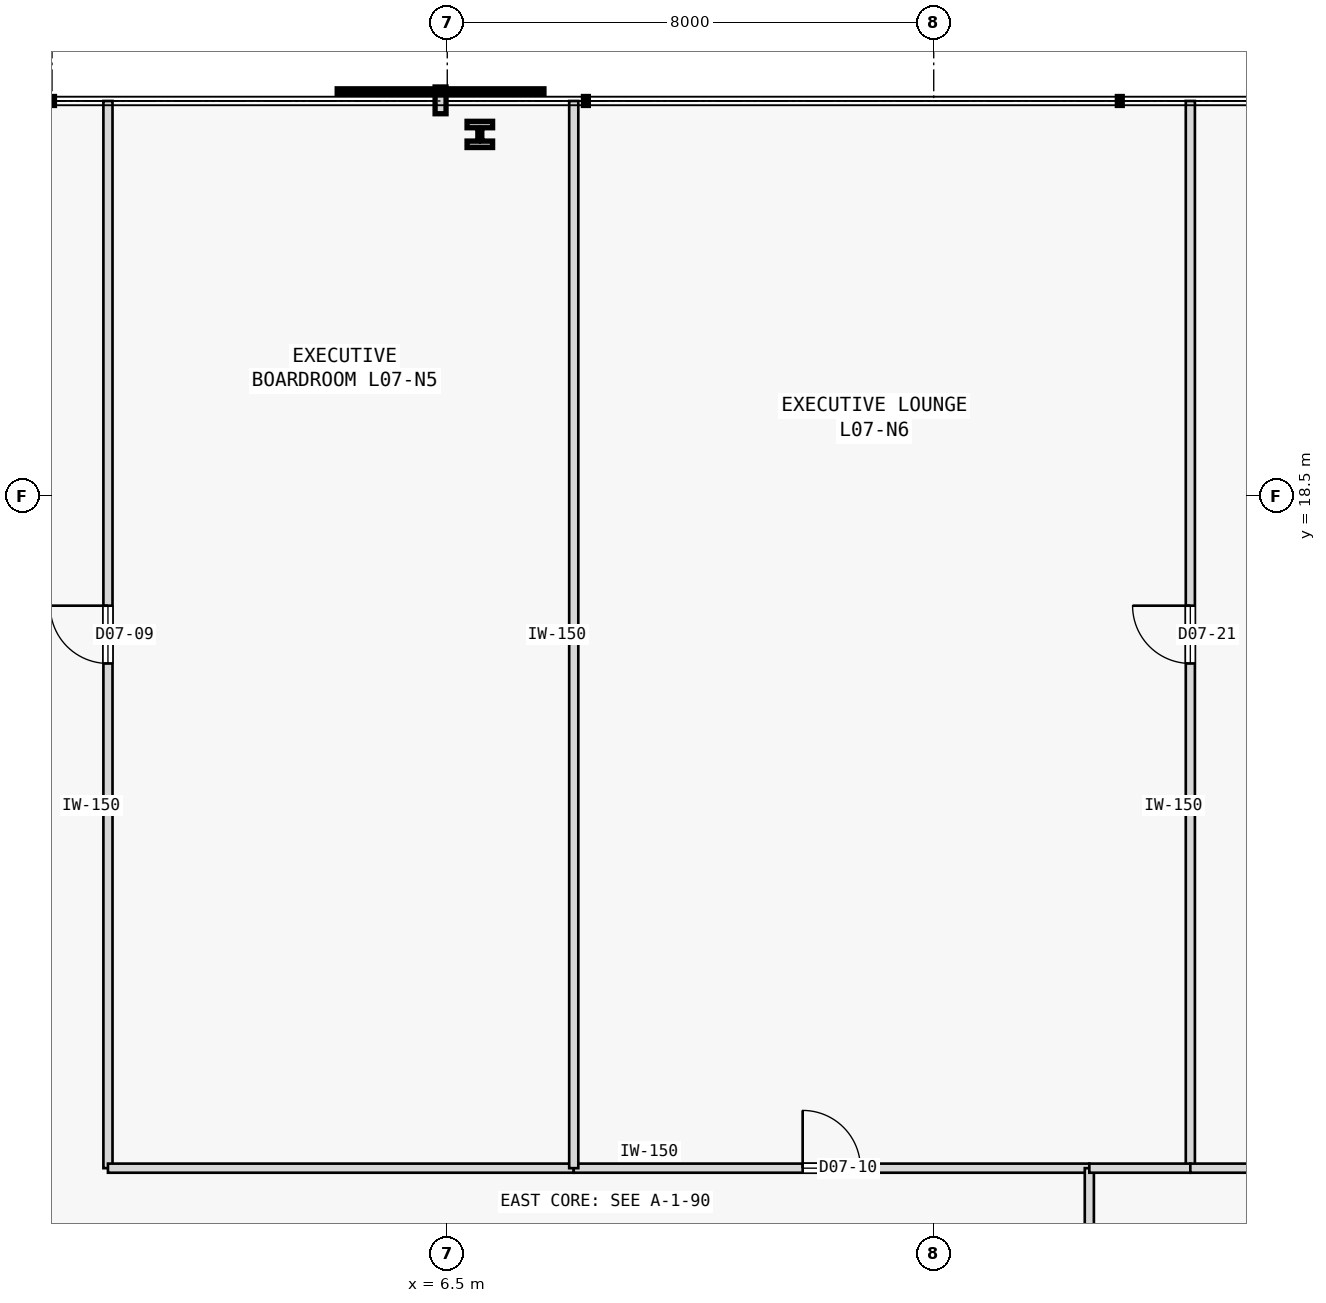
"""IFC4 building model, lengths in metres.
Left out: names, types, materials, properties, quantities, classifications, styles, units other than length and angle.
Written with IfcOpenShell. Run it as: python <this file> out.ifc"""

import sys

from ifc_helpers import new_model, si_unit, direction, frame, frame_2d, origin, origin_2d, place, context, subcontext, project, spatial, rectangle, i_section, extrude, element, fill, save


model = new_model("IFC4")
c1 = context("Model", 3, precision=1e-05, world=origin(), true_north=direction((0.0, 1.0)))
c2 = subcontext(c1, "Body", "Model", "MODEL_VIEW")
j1 = project(units=[si_unit("LENGTHUNIT", "METRE"), si_unit("PLANEANGLEUNIT", "RADIAN")], contexts=[c1])
p1 = place(None, origin())
s1 = spatial("IfcSite", under=j1, at=p1, CompositionType="ELEMENT")
p2 = place(p1, origin())
s2 = spatial("IfcBuilding", under=s1, at=p2, CompositionType="ELEMENT")
p3 = place(p2, frame((0.0, 0.0, 33.2)))
s3 = spatial("IfcBuildingStorey", under=s2, at=p3, CompositionType="ELEMENT", Elevation=33.2)
p4 = place(p3, frame((7.036, 24.45, 0.0), z_axis=(0.0, 0.0, 1.0), x_axis=(1.0, 0.0, 0.0)))
e1 = element("IfcColumn", 1, at=p4, inside=s3, PredefinedType="COLUMN", context=c2, shape_type="SweptSolid", body=[
    extrude(i_section(OverallWidth=0.42, OverallDepth=0.431, WebThickness=0.065, FlangeThickness=0.106, FilletRadius=0.015, at=origin_2d()), origin(), (0.0, 0.0, 1.0), 3.8),
])
p5 = place(p3, frame((0.92, 7.45, 0.0), z_axis=(0.0, 0.0, 1.0), x_axis=(0.0, 1.0, 0.0)))
e2 = element("IfcWall", 2, at=p5, inside=s3, PredefinedType="PARTITIONING", context=c2, shape_type="SweptSolid", body=[
    extrude(rectangle(XDim=17.55, YDim=0.15, at=frame_2d((8.775, 0.0))), origin(), (0.0, 0.0, 1.0), 3.575),
])
p6 = place(p5, frame((8.3, 0.0, 0.0)))
e3 = element("IfcOpeningElement", 3, at=p6, cuts=e2, PredefinedType="OPENING", context=c2, shape_type="SweptSolid", body=[
    extrude(rectangle(XDim=0.95, YDim=2.15, at=frame_2d((0.475, 1.075))), frame((0.0, 0.085, 0.0), z_axis=(0.0, -1.0, 0.0), x_axis=(1.0, 0.0, 0.0)), (0.0, 0.0, 1.0), 0.17),
])
p7 = place(p3, frame((0.92, 7.45, 0.0), z_axis=(0.0, 0.0, 1.0), x_axis=(1.0, 0.0, 0.0)))
e4 = element("IfcWall", 4, at=p7, inside=s3, PredefinedType="PARTITIONING", context=c2, shape_type="SweptSolid", body=[
    extrude(rectangle(XDim=7.66, YDim=0.15, at=frame_2d((3.83, 0.0))), origin(), (0.0, 0.0, 1.0), 3.575),
])
p8 = place(p3, frame((8.58, 7.45, 0.0), z_axis=(0.0, 0.0, 1.0), x_axis=(1.0, 0.0, 0.0)))
e5 = element("IfcWall", 5, at=p8, inside=s3, PredefinedType="PARTITIONING", context=c2, shape_type="SweptSolid", body=[
    extrude(rectangle(XDim=8.479, YDim=0.15, at=frame_2d((4.24, 0.0))), origin(), (0.0, 0.0, 1.0), 3.575),
])
p9 = place(p8, frame((3.764, 0.0, 0.0)))
e6 = element("IfcOpeningElement", 6, at=p9, cuts=e5, PredefinedType="OPENING", context=c2, shape_type="SweptSolid", body=[
    extrude(rectangle(XDim=0.95, YDim=2.15, at=frame_2d((0.475, 1.075))), frame((0.0, 0.085, 0.0), z_axis=(0.0, -1.0, 0.0), x_axis=(1.0, 0.0, 0.0)), (0.0, 0.0, 1.0), 0.17),
])
p10 = place(p3, frame((17.059, 0.92, 0.0), z_axis=(0.0, 0.0, 1.0), x_axis=(0.0, 1.0, 0.0)))
e7 = element("IfcWall", 7, at=p10, inside=s3, PredefinedType="PARTITIONING", context=c2, shape_type="SweptSolid", body=[
    extrude(rectangle(XDim=6.53, YDim=0.15, at=frame_2d((3.265, 0.0))), origin(), (0.0, 0.0, 1.0), 3.575),
])
p11 = place(p3, frame((8.58, 7.45, 0.0), z_axis=(0.0, 0.0, 1.0), x_axis=(0.0, 1.0, 0.0)))
e8 = element("IfcWall", 8, at=p11, inside=s3, PredefinedType="PARTITIONING", context=c2, shape_type="SweptSolid", body=[
    extrude(rectangle(XDim=17.55, YDim=0.15, at=frame_2d((8.775, 0.0))), origin(), (0.0, 0.0, 1.0), 3.575),
])
p12 = place(p3, frame((18.72, 7.45, 0.0), z_axis=(0.0, 0.0, 1.0), x_axis=(0.0, 1.0, 0.0)))
e9 = element("IfcWall", 9, at=p12, inside=s3, PredefinedType="PARTITIONING", context=c2, shape_type="SweptSolid", body=[
    extrude(rectangle(XDim=17.55, YDim=0.15, at=frame_2d((8.775, 0.0))), origin(), (0.0, 0.0, 1.0), 3.575),
])
p13 = place(p12, frame((8.3, 0.0, 0.0)))
e10 = element("IfcOpeningElement", 10, at=p13, cuts=e9, PredefinedType="OPENING", context=c2, shape_type="SweptSolid", body=[
    extrude(rectangle(XDim=0.95, YDim=2.15, at=frame_2d((0.475, 1.075))), frame((0.0, 0.085, 0.0), z_axis=(0.0, -1.0, 0.0), x_axis=(1.0, 0.0, 0.0)), (0.0, 0.0, 1.0), 0.17),
])
p14 = place(p3, frame((17.059, 7.45, 0.0), z_axis=(0.0, 0.0, 1.0), x_axis=(1.0, 0.0, 0.0)))
e11 = element("IfcWall", 11, at=p14, inside=s3, PredefinedType="PARTITIONING", context=c2, shape_type="SweptSolid", body=[
    extrude(rectangle(XDim=1.661, YDim=0.15, at=frame_2d((0.831, 0.0))), origin(), (0.0, 0.0, 1.0), 3.575),
])
p15 = place(p3, frame((18.72, 7.45, 0.0), z_axis=(0.0, 0.0, 1.0), x_axis=(1.0, 0.0, 0.0)))
e12 = element("IfcWall", 12, at=p15, inside=s3, PredefinedType="PARTITIONING", context=c2, shape_type="SweptSolid", body=[
    extrude(rectangle(XDim=10.14, YDim=0.15, at=frame_2d((5.07, 0.0))), origin(), (0.0, 0.0, 1.0), 3.125),
])
p16 = place(p6, origin())
e13 = element("IfcDoor", 13, at=p16, inside=s3, OperationType="SINGLE_SWING_RIGHT", PredefinedType="DOOR", context=c2, shape_type="SweptSolid", body=[
    extrude(rectangle(XDim=0.95, YDim=2.15, at=frame_2d((0.475, 1.075))), frame((0.0, 0.025, 0.0), z_axis=(0.0, -1.0, 0.0), x_axis=(1.0, 0.0, 0.0)), (0.0, 0.0, 1.0), 0.05),
])
fill(e3, e13)
p17 = place(p9, origin())
e14 = element("IfcDoor", 14, at=p17, inside=s3, OperationType="SINGLE_SWING_LEFT", PredefinedType="DOOR", context=c2, shape_type="SweptSolid", body=[
    extrude(rectangle(XDim=0.95, YDim=2.15, at=frame_2d((0.475, 1.075))), frame((0.0, 0.025, 0.0), z_axis=(0.0, -1.0, 0.0), x_axis=(1.0, 0.0, 0.0)), (0.0, 0.0, 1.0), 0.05),
])
fill(e6, e14)
p18 = place(p13, origin())
e15 = element("IfcDoor", 15, at=p18, inside=s3, OperationType="SINGLE_SWING_RIGHT", PredefinedType="DOOR", context=c2, shape_type="SweptSolid", body=[
    extrude(rectangle(XDim=0.95, YDim=2.15, at=frame_2d((0.475, 1.075))), frame((0.0, 0.025, 0.0), z_axis=(0.0, -1.0, 0.0), x_axis=(1.0, 0.0, 0.0)), (0.0, 0.0, 1.0), 0.05),
])
fill(e10, e15)
save(model, sys.argv[1])
